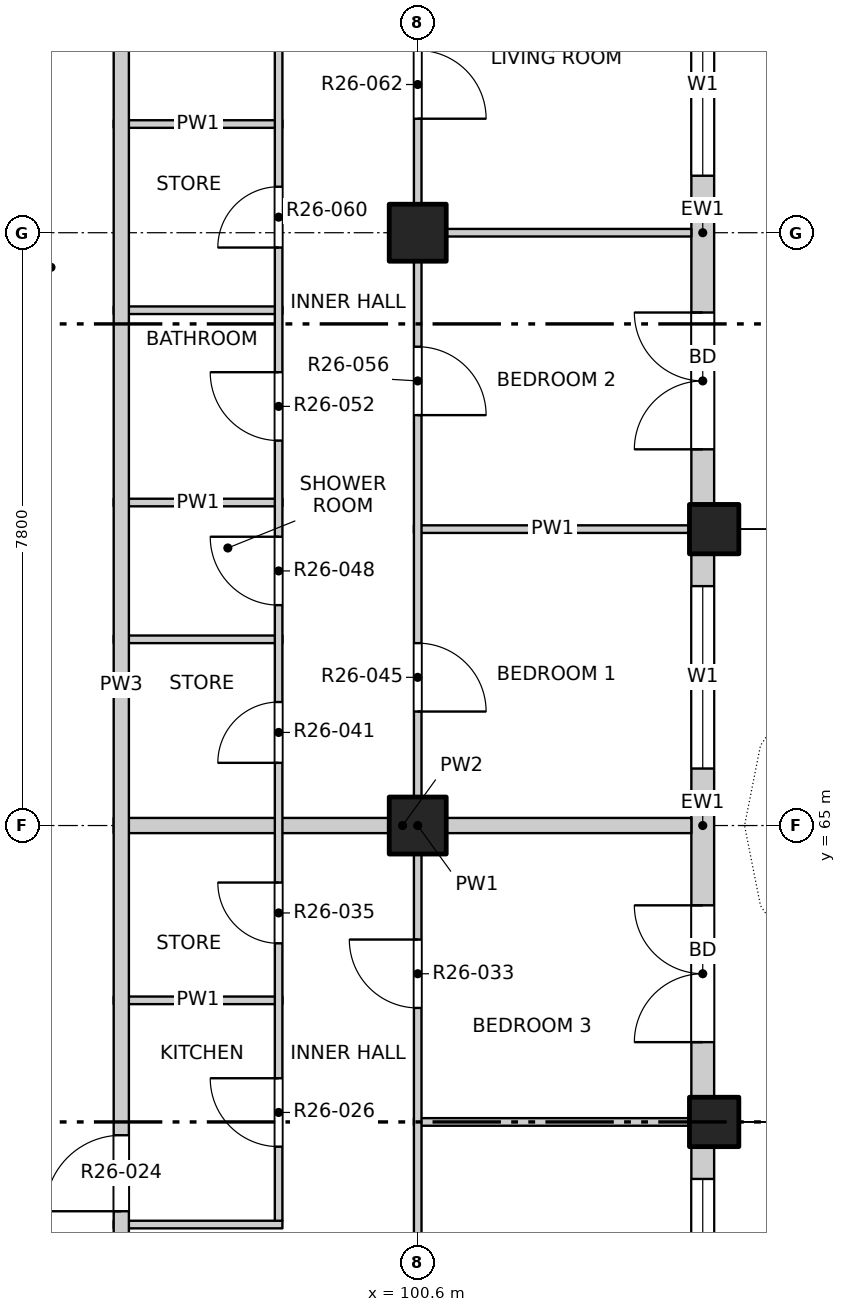
"""IFC4 building model, lengths in metres.
Left out: names, types, materials, properties, quantities, classifications, styles, units other than length and angle.
Written with IfcOpenShell. Run it as: python <this file> out.ifc"""

import sys

from ifc_helpers import new_model, si_unit, direction, frame, frame_2d, origin, origin_2d, place, context, subcontext, project, spatial, rectangle, extrude, element, fill, save


model = new_model("IFC4")
c1 = context("Model", 3, precision=1e-05, world=origin(), true_north=direction((0.0, 1.0)))
c2 = subcontext(c1, "Body", "Model", "MODEL_VIEW")
j1 = project(units=[si_unit("LENGTHUNIT", "METRE"), si_unit("PLANEANGLEUNIT", "RADIAN")], contexts=[c1])
p1 = place(None, origin())
s1 = spatial("IfcSite", under=j1, at=p1, CompositionType="ELEMENT")
p2 = place(p1, origin())
s2 = spatial("IfcBuilding", under=s1, at=p2, CompositionType="ELEMENT")
p3 = place(p2, frame((0.0, 0.0, 259.6)))
s3 = spatial("IfcBuildingStorey", under=s2, at=p3, CompositionType="ELEMENT", Elevation=259.6)
for number, where, z_axis, x_axis in (
    (1, (104.5, 61.1, -0.25), (0.0, 0.0, 1.0), (1.0, 0.0, 0.0)),
    (2, (104.5, 68.9, -0.25), (0.0, 0.0, 1.0), (1.0, 0.0, 0.0)),
):
    element("IfcColumn", number, at=place(p3, frame(where, z_axis=z_axis, x_axis=x_axis)), inside=s3, PredefinedType="COLUMN", context=c2, shape_type="SweptSolid", body=[
        extrude(rectangle(XDim=0.65, YDim=0.65, at=origin_2d()), origin(), (0.0, 0.0, 1.0), 3.4),
    ])
for number, where, z_axis, x_axis in (
    (3, (100.6, 65.0, -0.25), (0.0, 0.0, 1.0), (1.0, 0.0, 0.0)),
    (4, (100.6, 72.8, -0.25), (0.0, 0.0, 1.0), (1.0, 0.0, 0.0)),
):
    element("IfcColumn", number, at=place(p3, frame(where, z_axis=z_axis, x_axis=x_axis)), inside=s3, PredefinedType="COLUMN", context=c2, shape_type="SweptSolid", body=[
        extrude(rectangle(XDim=0.75, YDim=0.75, at=origin_2d()), origin(), (0.0, 0.0, 1.0), 3.4),
    ])
p4 = place(p3, frame((104.35, 53.625, 0.0), z_axis=(0.0, 0.0, 1.0), x_axis=(0.0, 1.0, 0.0)))
e5 = element("IfcWall", 5, at=p4, inside=s3, PredefinedType="SOLIDWALL", context=c2, shape_type="SweptSolid", body=[
    extrude(rectangle(XDim=7.15, YDim=0.3, at=frame_2d((3.575, 0.0))), origin(), (0.0, 0.0, 1.0), 3.15),
])
p5 = place(p4, frame((0.725, 0.0, 0.0)))
e6 = element("IfcOpeningElement", 6, at=p5, cuts=e5, PredefinedType="OPENING", context=c2, shape_type="SweptSolid", body=[
    extrude(rectangle(XDim=1.8, YDim=2.4, at=frame_2d((0.9, 1.2))), frame((0.0, 0.16, 0.0), z_axis=(0.0, -1.0, 0.0), x_axis=(1.0, 0.0, 0.0)), (0.0, 0.0, 1.0), 0.32),
])
p6 = place(p4, frame((4.325, 0.0, 0.9)))
e7 = element("IfcOpeningElement", 7, at=p6, cuts=e5, PredefinedType="OPENING", context=c2, shape_type="SweptSolid", body=[
    extrude(rectangle(XDim=2.4, YDim=1.8, at=frame_2d((1.2, 0.9))), frame((0.0, 0.16, 0.0), z_axis=(0.0, -1.0, 0.0), x_axis=(1.0, 0.0, 0.0)), (0.0, 0.0, 1.0), 0.32),
])
p7 = place(p3, frame((104.35, 61.425, 0.0), z_axis=(0.0, 0.0, 1.0), x_axis=(0.0, 1.0, 0.0)))
e8 = element("IfcWall", 8, at=p7, inside=s3, PredefinedType="SOLIDWALL", context=c2, shape_type="SweptSolid", body=[
    extrude(rectangle(XDim=7.15, YDim=0.3, at=frame_2d((3.575, 0.0))), origin(), (0.0, 0.0, 1.0), 3.15),
])
p8 = place(p7, frame((0.725, 0.0, 0.0)))
e9 = element("IfcOpeningElement", 9, at=p8, cuts=e8, PredefinedType="OPENING", context=c2, shape_type="SweptSolid", body=[
    extrude(rectangle(XDim=1.8, YDim=2.4, at=frame_2d((0.9, 1.2))), frame((0.0, 0.16, 0.0), z_axis=(0.0, -1.0, 0.0), x_axis=(1.0, 0.0, 0.0)), (0.0, 0.0, 1.0), 0.32),
])
p9 = place(p7, frame((4.325, 0.0, 0.9)))
e10 = element("IfcOpeningElement", 10, at=p9, cuts=e8, PredefinedType="OPENING", context=c2, shape_type="SweptSolid", body=[
    extrude(rectangle(XDim=2.4, YDim=1.8, at=frame_2d((1.2, 0.9))), frame((0.0, 0.16, 0.0), z_axis=(0.0, -1.0, 0.0), x_axis=(1.0, 0.0, 0.0)), (0.0, 0.0, 1.0), 0.32),
])
p10 = place(p3, frame((104.35, 69.225, 0.0), z_axis=(0.0, 0.0, 1.0), x_axis=(0.0, 1.0, 0.0)))
e11 = element("IfcWall", 11, at=p10, inside=s3, PredefinedType="SOLIDWALL", context=c2, shape_type="SweptSolid", body=[
    extrude(rectangle(XDim=7.15, YDim=0.3, at=frame_2d((3.575, 0.0))), origin(), (0.0, 0.0, 1.0), 3.15),
])
p11 = place(p10, frame((0.725, 0.0, 0.0)))
e12 = element("IfcOpeningElement", 12, at=p11, cuts=e11, PredefinedType="OPENING", context=c2, shape_type="SweptSolid", body=[
    extrude(rectangle(XDim=1.8, YDim=2.4, at=frame_2d((0.9, 1.2))), frame((0.0, 0.16, 0.0), z_axis=(0.0, -1.0, 0.0), x_axis=(1.0, 0.0, 0.0)), (0.0, 0.0, 1.0), 0.32),
])
p12 = place(p10, frame((4.325, 0.0, 0.9)))
e13 = element("IfcOpeningElement", 13, at=p12, cuts=e11, PredefinedType="OPENING", context=c2, shape_type="SweptSolid", body=[
    extrude(rectangle(XDim=2.4, YDim=1.8, at=frame_2d((1.2, 0.9))), frame((0.0, 0.16, 0.0), z_axis=(0.0, -1.0, 0.0), x_axis=(1.0, 0.0, 0.0)), (0.0, 0.0, 1.0), 0.32),
])
p13 = place(p3, frame((96.6, 59.75, 0.0), z_axis=(0.0, 0.0, 1.0), x_axis=(1.0, 0.0, 0.0)))
e14 = element("IfcWall", 14, at=p13, inside=s3, PredefinedType="PARTITIONING", context=c2, shape_type="SweptSolid", body=[
    extrude(rectangle(XDim=2.22, YDim=0.1, at=frame_2d((1.11, 0.0))), origin(), (0.0, 0.0, 1.0), 3.15),
])
p14 = place(p3, frame((100.55, 61.1, 0.0), z_axis=(0.0, 0.0, 1.0), x_axis=(1.0, 0.0, 0.0)))
e15 = element("IfcWall", 15, at=p14, inside=s3, PredefinedType="PARTITIONING", context=c2, shape_type="SweptSolid", body=[
    extrude(rectangle(XDim=3.65, YDim=0.1, at=frame_2d((1.825, 0.0))), origin(), (0.0, 0.0, 1.0), 3.15),
])
p15 = place(p3, frame((96.6, 62.7, 0.0), z_axis=(0.0, 0.0, 1.0), x_axis=(1.0, 0.0, 0.0)))
e16 = element("IfcWall", 16, at=p15, inside=s3, PredefinedType="PARTITIONING", context=c2, shape_type="SweptSolid", body=[
    extrude(rectangle(XDim=2.22, YDim=0.1, at=frame_2d((1.11, 0.0))), origin(), (0.0, 0.0, 1.0), 3.15),
])
p16 = place(p3, frame((96.6, 65.0, 0.0), z_axis=(0.0, 0.0, 1.0), x_axis=(1.0, 0.0, 0.0)))
e17 = element("IfcWall", 17, at=p16, inside=s3, PredefinedType="PARTITIONING", context=c2, shape_type="SweptSolid", body=[
    extrude(rectangle(XDim=7.6, YDim=0.2, at=frame_2d((3.8, 0.0))), origin(), (0.0, 0.0, 1.0), 3.15),
])
p17 = place(p3, frame((96.6, 67.45, 0.0), z_axis=(0.0, 0.0, 1.0), x_axis=(1.0, 0.0, 0.0)))
e18 = element("IfcWall", 18, at=p17, inside=s3, PredefinedType="PARTITIONING", context=c2, shape_type="SweptSolid", body=[
    extrude(rectangle(XDim=2.22, YDim=0.1, at=frame_2d((1.11, 0.0))), origin(), (0.0, 0.0, 1.0), 3.15),
])
p18 = place(p3, frame((100.55, 68.9, 0.0), z_axis=(0.0, 0.0, 1.0), x_axis=(1.0, 0.0, 0.0)))
e19 = element("IfcWall", 19, at=p18, inside=s3, PredefinedType="PARTITIONING", context=c2, shape_type="SweptSolid", body=[
    extrude(rectangle(XDim=3.65, YDim=0.1, at=frame_2d((1.825, 0.0))), origin(), (0.0, 0.0, 1.0), 3.15),
])
for number, where, z_axis, x_axis in (
    (20, (96.6, 69.25, 0.0), (0.0, 0.0, 1.0), (1.0, 0.0, 0.0)),
    (21, (96.6, 71.78, 0.0), (0.0, 0.0, 1.0), (1.0, 0.0, 0.0)),
):
    element("IfcWall", number, at=place(p3, frame(where, z_axis=z_axis, x_axis=x_axis)), inside=s3, PredefinedType="PARTITIONING", context=c2, shape_type="SweptSolid", body=[
        extrude(rectangle(XDim=2.22, YDim=0.1, at=frame_2d((1.11, 0.0))), origin(), (0.0, 0.0, 1.0), 3.15),
    ])
p19 = place(p3, frame((100.55, 72.8, 0.0), z_axis=(0.0, 0.0, 1.0), x_axis=(1.0, 0.0, 0.0)))
e22 = element("IfcWall", 22, at=p19, inside=s3, PredefinedType="PARTITIONING", context=c2, shape_type="SweptSolid", body=[
    extrude(rectangle(XDim=3.65, YDim=0.1, at=frame_2d((1.825, 0.0))), origin(), (0.0, 0.0, 1.0), 3.15),
])
p20 = place(p3, frame((96.6, 74.23, 0.0), z_axis=(0.0, 0.0, 1.0), x_axis=(1.0, 0.0, 0.0)))
e23 = element("IfcWall", 23, at=p20, inside=s3, PredefinedType="PARTITIONING", context=c2, shape_type="SweptSolid", body=[
    extrude(rectangle(XDim=2.22, YDim=0.1, at=frame_2d((1.11, 0.0))), origin(), (0.0, 0.0, 1.0), 3.15),
])
p21 = place(p3, frame((96.7, 49.5, 0.0), z_axis=(0.0, 0.0, 1.0), x_axis=(0.0, 1.0, 0.0)))
e24 = element("IfcWall", 24, at=p21, inside=s3, PredefinedType="PARTITIONING", context=c2, shape_type="SweptSolid", body=[
    extrude(rectangle(XDim=34.7, YDim=0.2, at=frame_2d((17.35, 0.0))), origin(), (0.0, 0.0, 1.0), 3.15),
])
p22 = place(p21, frame((10.425, 0.0, 0.0)))
e25 = element("IfcOpeningElement", 25, at=p22, cuts=e24, PredefinedType="OPENING", context=c2, shape_type="SweptSolid", body=[
    extrude(rectangle(XDim=1.0, YDim=2.1, at=frame_2d((0.5, 1.05))), frame((0.0, 0.11, 0.0), z_axis=(0.0, -1.0, 0.0), x_axis=(1.0, 0.0, 0.0)), (0.0, 0.0, 1.0), 0.22),
])
p23 = place(p21, frame((29.225, 0.0, 0.0)))
e26 = element("IfcOpeningElement", 26, at=p23, cuts=e24, PredefinedType="OPENING", context=c2, shape_type="SweptSolid", body=[
    extrude(rectangle(XDim=1.0, YDim=2.1, at=frame_2d((0.5, 1.05))), frame((0.0, 0.11, 0.0), z_axis=(0.0, -1.0, 0.0), x_axis=(1.0, 0.0, 0.0)), (0.0, 0.0, 1.0), 0.22),
])
p24 = place(p3, frame((98.77, 59.8, 0.0), z_axis=(0.0, 0.0, 1.0), x_axis=(0.0, 1.0, 0.0)))
e27 = element("IfcWall", 27, at=p24, inside=s3, PredefinedType="PARTITIONING", context=c2, shape_type="SweptSolid", body=[
    extrude(rectangle(XDim=17.6, YDim=0.1, at=frame_2d((8.8, 0.0))), origin(), (0.0, 0.0, 1.0), 3.15),
])
p25 = place(p24, frame((0.975, 0.0, 0.0)))
e28 = element("IfcOpeningElement", 28, at=p25, cuts=e27, PredefinedType="OPENING", context=c2, shape_type="SweptSolid", body=[
    extrude(rectangle(XDim=0.9, YDim=2.1, at=frame_2d((0.45, 1.05))), frame((0.0, 0.06, 0.0), z_axis=(0.0, -1.0, 0.0), x_axis=(1.0, 0.0, 0.0)), (0.0, 0.0, 1.0), 0.12),
])
p26 = place(p24, frame((3.65, 0.0, 0.0)))
e29 = element("IfcOpeningElement", 29, at=p26, cuts=e27, PredefinedType="OPENING", context=c2, shape_type="SweptSolid", body=[
    extrude(rectangle(XDim=0.8, YDim=2.1, at=frame_2d((0.4, 1.05))), frame((0.0, 0.06, 0.0), z_axis=(0.0, -1.0, 0.0), x_axis=(1.0, 0.0, 0.0)), (0.0, 0.0, 1.0), 0.12),
])
p27 = place(p24, frame((6.025, 0.0, 0.0)))
e30 = element("IfcOpeningElement", 30, at=p27, cuts=e27, PredefinedType="OPENING", context=c2, shape_type="SweptSolid", body=[
    extrude(rectangle(XDim=0.8, YDim=2.1, at=frame_2d((0.4, 1.05))), frame((0.0, 0.06, 0.0), z_axis=(0.0, -1.0, 0.0), x_axis=(1.0, 0.0, 0.0)), (0.0, 0.0, 1.0), 0.12),
])
p28 = place(p24, frame((8.1, 0.0, 0.0)))
e31 = element("IfcOpeningElement", 31, at=p28, cuts=e27, PredefinedType="OPENING", context=c2, shape_type="SweptSolid", body=[
    extrude(rectangle(XDim=0.9, YDim=2.1, at=frame_2d((0.45, 1.05))), frame((0.0, 0.06, 0.0), z_axis=(0.0, -1.0, 0.0), x_axis=(1.0, 0.0, 0.0)), (0.0, 0.0, 1.0), 0.12),
])
p29 = place(p24, frame((10.265, 0.0, 0.0)))
e32 = element("IfcOpeningElement", 32, at=p29, cuts=e27, PredefinedType="OPENING", context=c2, shape_type="SweptSolid", body=[
    extrude(rectangle(XDim=0.9, YDim=2.1, at=frame_2d((0.45, 1.05))), frame((0.0, 0.06, 0.0), z_axis=(0.0, -1.0, 0.0), x_axis=(1.0, 0.0, 0.0)), (0.0, 0.0, 1.0), 0.12),
])
p30 = place(p24, frame((12.805, 0.0, 0.0)))
e33 = element("IfcOpeningElement", 33, at=p30, cuts=e27, PredefinedType="OPENING", context=c2, shape_type="SweptSolid", body=[
    extrude(rectangle(XDim=0.8, YDim=2.1, at=frame_2d((0.4, 1.05))), frame((0.0, 0.06, 0.0), z_axis=(0.0, -1.0, 0.0), x_axis=(1.0, 0.0, 0.0)), (0.0, 0.0, 1.0), 0.12),
])
p31 = place(p24, frame((15.59, 0.0, 0.0)))
e34 = element("IfcOpeningElement", 34, at=p31, cuts=e27, PredefinedType="OPENING", context=c2, shape_type="SweptSolid", body=[
    extrude(rectangle(XDim=0.9, YDim=2.1, at=frame_2d((0.45, 1.05))), frame((0.0, 0.06, 0.0), z_axis=(0.0, -1.0, 0.0), x_axis=(1.0, 0.0, 0.0)), (0.0, 0.0, 1.0), 0.12),
])
p32 = place(p3, frame((100.6, 45.8, 0.0), z_axis=(0.0, 0.0, 1.0), x_axis=(0.0, 1.0, 0.0)))
e35 = element("IfcWall", 35, at=p32, inside=s3, PredefinedType="PARTITIONING", context=c2, shape_type="SweptSolid", body=[
    extrude(rectangle(XDim=38.4, YDim=0.1, at=frame_2d((19.2, 0.0))), origin(), (0.0, 0.0, 1.0), 3.15),
])
p33 = place(p32, frame((1.05, 0.0, 0.0)))
e36 = element("IfcOpeningElement", 36, at=p33, cuts=e35, PredefinedType="OPENING", context=c2, shape_type="SweptSolid", body=[
    extrude(rectangle(XDim=1.2, YDim=2.1, at=frame_2d((0.6, 1.05))), frame((0.0, 0.06, 0.0), z_axis=(0.0, -1.0, 0.0), x_axis=(1.0, 0.0, 0.0)), (0.0, 0.0, 1.0), 0.12),
])
p34 = place(p32, frame((5.1, 0.0, 0.0)))
e37 = element("IfcOpeningElement", 37, at=p34, cuts=e35, PredefinedType="OPENING", context=c2, shape_type="SweptSolid", body=[
    extrude(rectangle(XDim=0.9, YDim=2.1, at=frame_2d((0.45, 1.05))), frame((0.0, 0.06, 0.0), z_axis=(0.0, -1.0, 0.0), x_axis=(1.0, 0.0, 0.0)), (0.0, 0.0, 1.0), 0.12),
])
p35 = place(p32, frame((9.0, 0.0, 0.0)))
e38 = element("IfcOpeningElement", 38, at=p35, cuts=e35, PredefinedType="OPENING", context=c2, shape_type="SweptSolid", body=[
    extrude(rectangle(XDim=0.9, YDim=2.1, at=frame_2d((0.45, 1.05))), frame((0.0, 0.06, 0.0), z_axis=(0.0, -1.0, 0.0), x_axis=(1.0, 0.0, 0.0)), (0.0, 0.0, 1.0), 0.12),
])
p36 = place(p32, frame((12.9, 0.0, 0.0)))
e39 = element("IfcOpeningElement", 39, at=p36, cuts=e35, PredefinedType="OPENING", context=c2, shape_type="SweptSolid", body=[
    extrude(rectangle(XDim=0.9, YDim=2.1, at=frame_2d((0.45, 1.05))), frame((0.0, 0.06, 0.0), z_axis=(0.0, -1.0, 0.0), x_axis=(1.0, 0.0, 0.0)), (0.0, 0.0, 1.0), 0.12),
])
p37 = place(p32, frame((16.8, 0.0, 0.0)))
e40 = element("IfcOpeningElement", 40, at=p37, cuts=e35, PredefinedType="OPENING", context=c2, shape_type="SweptSolid", body=[
    extrude(rectangle(XDim=0.9, YDim=2.1, at=frame_2d((0.45, 1.05))), frame((0.0, 0.06, 0.0), z_axis=(0.0, -1.0, 0.0), x_axis=(1.0, 0.0, 0.0)), (0.0, 0.0, 1.0), 0.12),
])
p38 = place(p32, frame((20.7, 0.0, 0.0)))
e41 = element("IfcOpeningElement", 41, at=p38, cuts=e35, PredefinedType="OPENING", context=c2, shape_type="SweptSolid", body=[
    extrude(rectangle(XDim=0.9, YDim=2.1, at=frame_2d((0.45, 1.05))), frame((0.0, 0.06, 0.0), z_axis=(0.0, -1.0, 0.0), x_axis=(1.0, 0.0, 0.0)), (0.0, 0.0, 1.0), 0.12),
])
p39 = place(p32, frame((24.6, 0.0, 0.0)))
e42 = element("IfcOpeningElement", 42, at=p39, cuts=e35, PredefinedType="OPENING", context=c2, shape_type="SweptSolid", body=[
    extrude(rectangle(XDim=0.9, YDim=2.1, at=frame_2d((0.45, 1.05))), frame((0.0, 0.06, 0.0), z_axis=(0.0, -1.0, 0.0), x_axis=(1.0, 0.0, 0.0)), (0.0, 0.0, 1.0), 0.12),
])
p40 = place(p32, frame((28.5, 0.0, 0.0)))
e43 = element("IfcOpeningElement", 43, at=p40, cuts=e35, PredefinedType="OPENING", context=c2, shape_type="SweptSolid", body=[
    extrude(rectangle(XDim=0.9, YDim=2.1, at=frame_2d((0.45, 1.05))), frame((0.0, 0.06, 0.0), z_axis=(0.0, -1.0, 0.0), x_axis=(1.0, 0.0, 0.0)), (0.0, 0.0, 1.0), 0.12),
])
p41 = place(p32, frame((32.4, 0.0, 0.0)))
e44 = element("IfcOpeningElement", 44, at=p41, cuts=e35, PredefinedType="OPENING", context=c2, shape_type="SweptSolid", body=[
    extrude(rectangle(XDim=0.9, YDim=2.1, at=frame_2d((0.45, 1.05))), frame((0.0, 0.06, 0.0), z_axis=(0.0, -1.0, 0.0), x_axis=(1.0, 0.0, 0.0)), (0.0, 0.0, 1.0), 0.12),
])
p42 = place(p32, frame((36.15, 0.0, 0.0)))
e45 = element("IfcOpeningElement", 45, at=p42, cuts=e35, PredefinedType="OPENING", context=c2, shape_type="SweptSolid", body=[
    extrude(rectangle(XDim=1.2, YDim=2.1, at=frame_2d((0.6, 1.05))), frame((0.0, 0.06, 0.0), z_axis=(0.0, -1.0, 0.0), x_axis=(1.0, 0.0, 0.0)), (0.0, 0.0, 1.0), 0.12),
])
p43 = place(p6, origin())
e46 = element("IfcWindow", 46, at=p43, inside=s3, PartitioningType="DOUBLE_PANEL_VERTICAL", PredefinedType="WINDOW", context=c2, shape_type="SweptSolid", body=[
    extrude(rectangle(XDim=2.4, YDim=1.8, at=frame_2d((1.2, 0.9))), frame((0.0, 0.03, 0.0), z_axis=(0.0, -1.0, 0.0), x_axis=(1.0, 0.0, 0.0)), (0.0, 0.0, 1.0), 0.06),
])
fill(e7, e46)
p44 = place(p8, origin())
e47 = element("IfcDoor", 47, at=p44, inside=s3, OperationType="DOUBLE_DOOR_SINGLE_SWING", PredefinedType="DOOR", context=c2, shape_type="SweptSolid", body=[
    extrude(rectangle(XDim=1.8, YDim=2.4, at=frame_2d((0.9, 1.2))), frame((0.0, 0.025, 0.0), z_axis=(0.0, -1.0, 0.0), x_axis=(1.0, 0.0, 0.0)), (0.0, 0.0, 1.0), 0.05),
])
fill(e9, e47)
p45 = place(p9, origin())
e48 = element("IfcWindow", 48, at=p45, inside=s3, PartitioningType="DOUBLE_PANEL_VERTICAL", PredefinedType="WINDOW", context=c2, shape_type="SweptSolid", body=[
    extrude(rectangle(XDim=2.4, YDim=1.8, at=frame_2d((1.2, 0.9))), frame((0.0, 0.03, 0.0), z_axis=(0.0, -1.0, 0.0), x_axis=(1.0, 0.0, 0.0)), (0.0, 0.0, 1.0), 0.06),
])
fill(e10, e48)
p46 = place(p11, origin())
e49 = element("IfcDoor", 49, at=p46, inside=s3, OperationType="DOUBLE_DOOR_SINGLE_SWING", PredefinedType="DOOR", context=c2, shape_type="SweptSolid", body=[
    extrude(rectangle(XDim=1.8, YDim=2.4, at=frame_2d((0.9, 1.2))), frame((0.0, 0.025, 0.0), z_axis=(0.0, -1.0, 0.0), x_axis=(1.0, 0.0, 0.0)), (0.0, 0.0, 1.0), 0.05),
])
fill(e12, e49)
p47 = place(p12, origin())
e50 = element("IfcWindow", 50, at=p47, inside=s3, PartitioningType="DOUBLE_PANEL_VERTICAL", PredefinedType="WINDOW", context=c2, shape_type="SweptSolid", body=[
    extrude(rectangle(XDim=2.4, YDim=1.8, at=frame_2d((1.2, 0.9))), frame((0.0, 0.03, 0.0), z_axis=(0.0, -1.0, 0.0), x_axis=(1.0, 0.0, 0.0)), (0.0, 0.0, 1.0), 0.06),
])
fill(e13, e50)
p48 = place(p22, origin())
e51 = element("IfcDoor", 51, at=p48, inside=s3, OperationType="SINGLE_SWING_LEFT", PredefinedType="DOOR", context=c2, shape_type="SweptSolid", body=[
    extrude(rectangle(XDim=1.0, YDim=2.1, at=frame_2d((0.5, 1.05))), frame((0.0, 0.025, 0.0), z_axis=(0.0, -1.0, 0.0), x_axis=(1.0, 0.0, 0.0)), (0.0, 0.0, 1.0), 0.05),
])
fill(e25, e51)
p49 = place(p25, origin())
e52 = element("IfcDoor", 52, at=p49, inside=s3, OperationType="SINGLE_SWING_RIGHT", PredefinedType="DOOR", context=c2, shape_type="SweptSolid", body=[
    extrude(rectangle(XDim=0.9, YDim=2.1, at=frame_2d((0.45, 1.05))), frame((0.0, 0.025, 0.0), z_axis=(0.0, -1.0, 0.0), x_axis=(1.0, 0.0, 0.0)), (0.0, 0.0, 1.0), 0.05),
])
fill(e28, e52)
p50 = place(p37, origin())
e53 = element("IfcDoor", 53, at=p50, inside=s3, OperationType="SINGLE_SWING_RIGHT", PredefinedType="DOOR", context=c2, shape_type="SweptSolid", body=[
    extrude(rectangle(XDim=0.9, YDim=2.1, at=frame_2d((0.45, 1.05))), frame((0.0, 0.025, 0.0), z_axis=(0.0, -1.0, 0.0), x_axis=(1.0, 0.0, 0.0)), (0.0, 0.0, 1.0), 0.05),
])
fill(e40, e53)
p51 = place(p26, origin())
e54 = element("IfcDoor", 54, at=p51, inside=s3, OperationType="SINGLE_SWING_RIGHT", PredefinedType="DOOR", context=c2, shape_type="SweptSolid", body=[
    extrude(rectangle(XDim=0.8, YDim=2.1, at=frame_2d((0.4, 1.05))), frame((0.0, 0.025, 0.0), z_axis=(0.0, -1.0, 0.0), x_axis=(1.0, 0.0, 0.0)), (0.0, 0.0, 1.0), 0.05),
])
fill(e29, e54)
p52 = place(p27, origin())
e55 = element("IfcDoor", 55, at=p52, inside=s3, OperationType="SINGLE_SWING_LEFT", PredefinedType="DOOR", context=c2, shape_type="SweptSolid", body=[
    extrude(rectangle(XDim=0.8, YDim=2.1, at=frame_2d((0.4, 1.05))), frame((0.0, 0.025, 0.0), z_axis=(0.0, -1.0, 0.0), x_axis=(1.0, 0.0, 0.0)), (0.0, 0.0, 1.0), 0.05),
])
fill(e30, e55)
p53 = place(p38, origin())
e56 = element("IfcDoor", 56, at=p53, inside=s3, OperationType="SINGLE_SWING_RIGHT", PredefinedType="DOOR", context=c2, shape_type="SweptSolid", body=[
    extrude(rectangle(XDim=0.9, YDim=2.1, at=frame_2d((0.45, 1.05))), frame((0.0, 0.025, 0.0), z_axis=(0.0, -1.0, 0.0), x_axis=(1.0, 0.0, 0.0)), (0.0, 0.0, 1.0), 0.05),
])
fill(e41, e56)
p54 = place(p28, origin())
e57 = element("IfcDoor", 57, at=p54, inside=s3, OperationType="SINGLE_SWING_RIGHT", PredefinedType="DOOR", context=c2, shape_type="SweptSolid", body=[
    extrude(rectangle(XDim=0.9, YDim=2.1, at=frame_2d((0.45, 1.05))), frame((0.0, 0.025, 0.0), z_axis=(0.0, -1.0, 0.0), x_axis=(1.0, 0.0, 0.0)), (0.0, 0.0, 1.0), 0.05),
])
fill(e31, e57)
p55 = place(p29, origin())
e58 = element("IfcDoor", 58, at=p55, inside=s3, OperationType="SINGLE_SWING_RIGHT", PredefinedType="DOOR", context=c2, shape_type="SweptSolid", body=[
    extrude(rectangle(XDim=0.9, YDim=2.1, at=frame_2d((0.45, 1.05))), frame((0.0, 0.025, 0.0), z_axis=(0.0, -1.0, 0.0), x_axis=(1.0, 0.0, 0.0)), (0.0, 0.0, 1.0), 0.05),
])
fill(e32, e58)
p56 = place(p39, origin())
e59 = element("IfcDoor", 59, at=p56, inside=s3, OperationType="SINGLE_SWING_RIGHT", PredefinedType="DOOR", context=c2, shape_type="SweptSolid", body=[
    extrude(rectangle(XDim=0.9, YDim=2.1, at=frame_2d((0.45, 1.05))), frame((0.0, 0.025, 0.0), z_axis=(0.0, -1.0, 0.0), x_axis=(1.0, 0.0, 0.0)), (0.0, 0.0, 1.0), 0.05),
])
fill(e42, e59)
p57 = place(p30, origin())
e60 = element("IfcDoor", 60, at=p57, inside=s3, OperationType="SINGLE_SWING_LEFT", PredefinedType="DOOR", context=c2, shape_type="SweptSolid", body=[
    extrude(rectangle(XDim=0.8, YDim=2.1, at=frame_2d((0.4, 1.05))), frame((0.0, 0.025, 0.0), z_axis=(0.0, -1.0, 0.0), x_axis=(1.0, 0.0, 0.0)), (0.0, 0.0, 1.0), 0.05),
])
fill(e33, e60)
p58 = place(p40, origin())
e61 = element("IfcDoor", 61, at=p58, inside=s3, OperationType="SINGLE_SWING_RIGHT", PredefinedType="DOOR", context=c2, shape_type="SweptSolid", body=[
    extrude(rectangle(XDim=0.9, YDim=2.1, at=frame_2d((0.45, 1.05))), frame((0.0, 0.025, 0.0), z_axis=(0.0, -1.0, 0.0), x_axis=(1.0, 0.0, 0.0)), (0.0, 0.0, 1.0), 0.05),
])
fill(e43, e61)
save(model, sys.argv[1])
